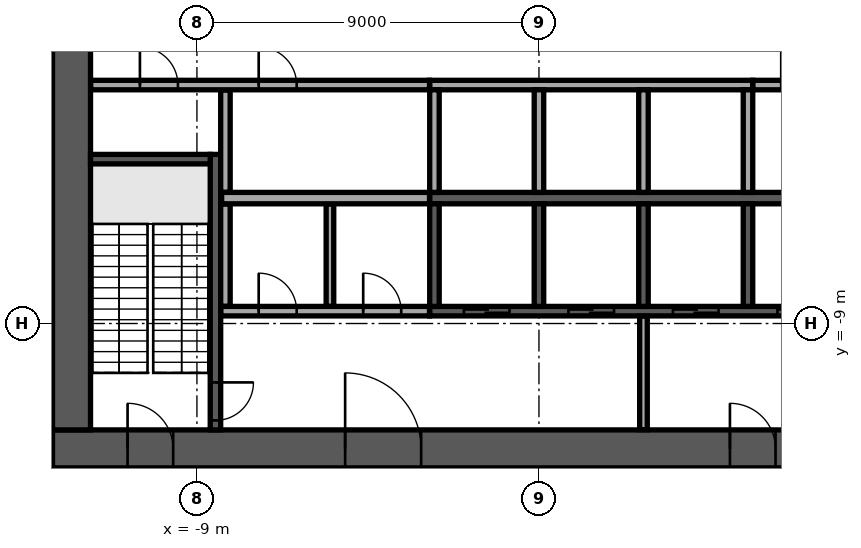
"""IFC4 building model, lengths in metres.
Left out: names, types, materials, properties, quantities, classifications, styles, units other than length and angle.
Written with IfcOpenShell. Run it as: python <this file> out.ifc"""

import sys

from ifc_helpers import new_model, si_unit, direction, frame, frame_2d, origin, place, context, subcontext, project, spatial, rectangle, extrude, element, fill, save


model = new_model("IFC4")
c1 = context("Model", 3, precision=1e-05, world=origin(), true_north=direction((0.0, 1.0)))
c2 = subcontext(c1, "Body", "Model", "MODEL_VIEW")
j1 = project(units=[si_unit("LENGTHUNIT", "METRE"), si_unit("PLANEANGLEUNIT", "RADIAN")], contexts=[c1])
p1 = place(None, origin())
s1 = spatial("IfcSite", under=j1, at=p1, CompositionType="ELEMENT")
p2 = place(p1, origin())
s2 = spatial("IfcBuilding", under=s1, at=p2, CompositionType="ELEMENT")
p3 = place(p2, frame((0.0, 0.0, 183.7)))
s3 = spatial("IfcBuildingStorey", under=s2, at=p3, CompositionType="ELEMENT", Elevation=183.7)
p4 = place(p3, frame((-12.8, -12.3, 0.0), z_axis=(0.0, 0.0, 1.0), x_axis=(1.0, 0.0, 0.0)))
e1 = element("IfcWall", 1, at=p4, inside=s3, PredefinedType="SHEAR", context=c2, shape_type="SweptSolid", body=[
    extrude(rectangle(XDim=25.6, YDim=1.0, at=frame_2d((12.8, 0.0))), origin(), (0.0, 0.0, 1.0), 5.22),
])
p5 = place(p4, frame((7.7, 0.0, 0.0)))
e2 = element("IfcOpeningElement", 2, at=p5, cuts=e1, PredefinedType="OPENING", context=c2, shape_type="SweptSolid", body=[
    extrude(rectangle(XDim=2.0, YDim=2.1, at=frame_2d((1.0, 1.05))), frame((0.0, 0.51, 0.0), z_axis=(0.0, -1.0, 0.0), x_axis=(1.0, 0.0, 0.0)), (0.0, 0.0, 1.0), 1.02),
])
p6 = place(p4, frame((17.825, 0.0, 0.0)))
e3 = element("IfcOpeningElement", 3, at=p6, cuts=e1, PredefinedType="OPENING", context=c2, shape_type="SweptSolid", body=[
    extrude(rectangle(XDim=1.2, YDim=2.1, at=frame_2d((0.6, 1.05))), frame((0.0, 0.51, 0.0), z_axis=(0.0, -1.0, 0.0), x_axis=(1.0, 0.0, 0.0)), (0.0, 0.0, 1.0), 1.02),
])
p7 = place(p4, frame((1.975, 0.0, 0.0)))
e4 = element("IfcOpeningElement", 4, at=p7, cuts=e1, PredefinedType="OPENING", context=c2, shape_type="SweptSolid", body=[
    extrude(rectangle(XDim=1.2, YDim=2.1, at=frame_2d((0.6, 1.05))), frame((0.0, 0.51, 0.0), z_axis=(0.0, -1.0, 0.0), x_axis=(1.0, 0.0, 0.0)), (0.0, 0.0, 1.0), 1.02),
])
p8 = place(p4, frame((22.425, 0.0, 0.0)))
e5 = element("IfcOpeningElement", 5, at=p8, cuts=e1, PredefinedType="OPENING", context=c2, shape_type="SweptSolid", body=[
    extrude(rectangle(XDim=1.2, YDim=2.1, at=frame_2d((0.6, 1.05))), frame((0.0, 0.51, 0.0), z_axis=(0.0, -1.0, 0.0), x_axis=(1.0, 0.0, 0.0)), (0.0, 0.0, 1.0), 1.02),
])
p9 = place(p3, frame((-12.3, -11.8, 0.0), z_axis=(0.0, 0.0, 1.0), x_axis=(0.0, 1.0, 0.0)))
e6 = element("IfcWall", 6, at=p9, inside=s3, PredefinedType="SHEAR", context=c2, shape_type="SweptSolid", body=[
    extrude(rectangle(XDim=23.6, YDim=1.0, at=frame_2d((11.8, 0.0))), origin(), (0.0, 0.0, 1.0), 5.22),
])
p10 = place(p9, frame((10.6, 0.0, 0.0)))
e7 = element("IfcOpeningElement", 7, at=p10, cuts=e6, PredefinedType="OPENING", context=c2, shape_type="SweptSolid", body=[
    extrude(rectangle(XDim=2.4, YDim=2.4, at=frame_2d((1.2, 1.2))), frame((0.0, 0.51, 0.0), z_axis=(0.0, -1.0, 0.0), x_axis=(1.0, 0.0, 0.0)), (0.0, 0.0, 1.0), 1.02),
])
p11 = place(p3, frame((-2.875, -5.7, 0.0), z_axis=(0.0, 0.0, 1.0), x_axis=(1.0, 0.0, 0.0)))
e8 = element("IfcWall", 8, at=p11, inside=s3, PredefinedType="SOLIDWALL", context=c2, shape_type="SweptSolid", body=[
    extrude(rectangle(XDim=11.25, YDim=0.3, at=frame_2d((5.625, 0.0))), origin(), (0.0, 0.0, 1.0), 5.22),
])
p12 = place(p3, frame((-2.875, -2.725, 0.0), z_axis=(0.0, 0.0, 1.0), x_axis=(1.0, 0.0, 0.0)))
e9 = element("IfcWall", 9, at=p12, inside=s3, PredefinedType="SOLIDWALL", context=c2, shape_type="SweptSolid", body=[
    extrude(rectangle(XDim=8.5, YDim=0.25, at=frame_2d((4.25, 0.0))), origin(), (0.0, 0.0, 1.0), 5.22),
])
for number, where, z_axis, x_axis in (
    (10, (-2.75, -5.55, 0.0), (0.0, 0.0, 1.0), (0.0, 1.0, 0.0)),
    (11, (0.0, -5.55, 0.0), (0.0, 0.0, 1.0), (0.0, 1.0, 0.0)),
    (12, (2.75, -5.55, 0.0), (0.0, 0.0, 1.0), (0.0, 1.0, 0.0)),
    (13, (5.5, -5.55, 0.0), (0.0, 0.0, 1.0), (0.0, 1.0, 0.0)),
):
    element("IfcWall", number, at=place(p3, frame(where, z_axis=z_axis, x_axis=x_axis)), inside=s3, PredefinedType="SOLIDWALL", context=c2, shape_type="SweptSolid", body=[
        extrude(rectangle(XDim=2.7, YDim=0.25, at=frame_2d((1.35, 0.0))), origin(), (0.0, 0.0, 1.0), 5.22),
    ])
p13 = place(p3, frame((-2.875, -8.675, 0.0), z_axis=(0.0, 0.0, 1.0), x_axis=(1.0, 0.0, 0.0)))
e14 = element("IfcWall", 14, at=p13, inside=s3, PredefinedType="SOLIDWALL", context=c2, shape_type="SweptSolid", body=[
    extrude(rectangle(XDim=11.25, YDim=0.25, at=frame_2d((5.625, 0.0))), origin(), (0.0, 0.0, 1.0), 5.22),
])
p14 = place(p13, frame((0.9, 0.0, 0.0)))
e15 = element("IfcOpeningElement", 15, at=p14, cuts=e14, PredefinedType="OPENING", context=c2, shape_type="SweptSolid", body=[
    extrude(rectangle(XDim=1.2, YDim=2.1, at=frame_2d((0.6, 1.05))), frame((0.0, 0.135, 0.0), z_axis=(0.0, -1.0, 0.0), x_axis=(1.0, 0.0, 0.0)), (0.0, 0.0, 1.0), 0.27),
])
p15 = place(p13, frame((3.65, 0.0, 0.0)))
e16 = element("IfcOpeningElement", 16, at=p15, cuts=e14, PredefinedType="OPENING", context=c2, shape_type="SweptSolid", body=[
    extrude(rectangle(XDim=1.2, YDim=2.1, at=frame_2d((0.6, 1.05))), frame((0.0, 0.135, 0.0), z_axis=(0.0, -1.0, 0.0), x_axis=(1.0, 0.0, 0.0)), (0.0, 0.0, 1.0), 0.27),
])
p16 = place(p13, frame((6.4, 0.0, 0.0)))
e17 = element("IfcOpeningElement", 17, at=p16, cuts=e14, PredefinedType="OPENING", context=c2, shape_type="SweptSolid", body=[
    extrude(rectangle(XDim=1.2, YDim=2.1, at=frame_2d((0.6, 1.05))), frame((0.0, 0.135, 0.0), z_axis=(0.0, -1.0, 0.0), x_axis=(1.0, 0.0, 0.0)), (0.0, 0.0, 1.0), 0.27),
])
p17 = place(p13, frame((9.15, 0.0, 0.0)))
e18 = element("IfcOpeningElement", 18, at=p17, cuts=e14, PredefinedType="OPENING", context=c2, shape_type="SweptSolid", body=[
    extrude(rectangle(XDim=1.2, YDim=2.1, at=frame_2d((0.6, 1.05))), frame((0.0, 0.135, 0.0), z_axis=(0.0, -1.0, 0.0), x_axis=(1.0, 0.0, 0.0)), (0.0, 0.0, 1.0), 0.27),
])
for number, where, z_axis, x_axis in (
    (19, (-2.75, -8.55, 0.0), (0.0, 0.0, 1.0), (0.0, 1.0, 0.0)),
    (20, (0.0, -8.55, 0.0), (0.0, 0.0, 1.0), (0.0, 1.0, 0.0)),
    (21, (2.75, -8.55, 0.0), (0.0, 0.0, 1.0), (0.0, 1.0, 0.0)),
    (22, (5.5, -8.55, 0.0), (0.0, 0.0, 1.0), (0.0, 1.0, 0.0)),
):
    element("IfcWall", number, at=place(p3, frame(where, z_axis=z_axis, x_axis=x_axis)), inside=s3, PredefinedType="SOLIDWALL", context=c2, shape_type="SweptSolid", body=[
        extrude(rectangle(XDim=2.7, YDim=0.25, at=frame_2d((1.35, 0.0))), origin(), (0.0, 0.0, 1.0), 5.22),
    ])
p18 = place(p3, frame((-8.512, -4.55, 0.0), z_axis=(0.0, 0.0, 1.0), x_axis=(0.0, -1.0, 0.0)))
e23 = element("IfcWall", 23, at=p18, inside=s3, PredefinedType="SOLIDWALL", context=c2, shape_type="SweptSolid", body=[
    extrude(rectangle(XDim=7.25, YDim=0.275, at=frame_2d((3.625, 0.0))), origin(), (0.0, 0.0, 1.0), 5.22),
])
p19 = place(p18, frame((6.0, 0.0, 0.0)))
e24 = element("IfcOpeningElement", 24, at=p19, cuts=e23, PredefinedType="OPENING", context=c2, shape_type="SweptSolid", body=[
    extrude(rectangle(XDim=1.0, YDim=2.1, at=frame_2d((0.5, 1.05))), frame((0.0, 0.147, 0.0), z_axis=(0.0, -1.0, 0.0), x_axis=(1.0, 0.0, 0.0)), (0.0, 0.0, 1.0), 0.295),
])
p20 = place(p3, frame((-8.65, -4.675, 0.0), z_axis=(0.0, 0.0, 1.0), x_axis=(-1.0, 0.0, 0.0)))
e25 = element("IfcWall", 25, at=p20, inside=s3, PredefinedType="SOLIDWALL", context=c2, shape_type="SweptSolid", body=[
    extrude(rectangle(XDim=3.15, YDim=0.25, at=frame_2d((1.575, 0.0))), origin(), (0.0, 0.0, 1.0), 5.22),
])
p21 = place(p3, frame((2.75, -11.795, 0.0), z_axis=(0.0, 0.0, 1.0), x_axis=(0.0, 1.0, 0.0)))
e26 = element("IfcWall", 26, at=p21, inside=s3, PredefinedType="PARTITIONING", context=c2, shape_type="SweptSolid", body=[
    extrude(rectangle(XDim=2.99, YDim=0.2, at=frame_2d((1.495, 0.0))), origin(), (0.0, 0.0, 1.0), 5.22),
])
p22 = place(p3, frame((-8.37, -8.675, 0.0), z_axis=(0.0, 0.0, 1.0), x_axis=(1.0, 0.0, 0.0)))
e27 = element("IfcWall", 27, at=p22, inside=s3, PredefinedType="PARTITIONING", context=c2, shape_type="SweptSolid", body=[
    extrude(rectangle(XDim=5.49, YDim=0.25, at=frame_2d((2.745, 0.0))), origin(), (0.0, 0.0, 1.0), 5.22),
])
p23 = place(p22, frame((0.995, 0.0, 0.0)))
e28 = element("IfcOpeningElement", 28, at=p23, cuts=e27, PredefinedType="OPENING", context=c2, shape_type="SweptSolid", body=[
    extrude(rectangle(XDim=1.0, YDim=2.1, at=frame_2d((0.5, 1.05))), frame((0.0, 0.135, 0.0), z_axis=(0.0, -1.0, 0.0), x_axis=(1.0, 0.0, 0.0)), (0.0, 0.0, 1.0), 0.27),
])
p24 = place(p22, frame((3.745, 0.0, 0.0)))
e29 = element("IfcOpeningElement", 29, at=p24, cuts=e27, PredefinedType="OPENING", context=c2, shape_type="SweptSolid", body=[
    extrude(rectangle(XDim=1.0, YDim=2.1, at=frame_2d((0.5, 1.05))), frame((0.0, 0.135, 0.0), z_axis=(0.0, -1.0, 0.0), x_axis=(1.0, 0.0, 0.0)), (0.0, 0.0, 1.0), 0.27),
])
p25 = place(p3, frame((-8.25, -8.545, 0.0), z_axis=(0.0, 0.0, 1.0), x_axis=(0.0, 1.0, 0.0)))
e30 = element("IfcWall", 30, at=p25, inside=s3, PredefinedType="PARTITIONING", context=c2, shape_type="SweptSolid", body=[
    extrude(rectangle(XDim=2.69, YDim=0.25, at=frame_2d((1.345, 0.0))), origin(), (0.0, 0.0, 1.0), 5.22),
])
p26 = place(p3, frame((-5.5, -8.545, 0.0), z_axis=(0.0, 0.0, 1.0), x_axis=(0.0, 1.0, 0.0)))
e31 = element("IfcWall", 31, at=p26, inside=s3, PredefinedType="PARTITIONING", context=c2, shape_type="SweptSolid", body=[
    extrude(rectangle(XDim=2.69, YDim=0.2, at=frame_2d((1.345, 0.0))), origin(), (0.0, 0.0, 1.0), 5.22),
])
p27 = place(p3, frame((-8.35, -5.7, 0.0), z_axis=(0.0, 0.0, 1.0), x_axis=(1.0, 0.0, 0.0)))
e32 = element("IfcWall", 32, at=p27, inside=s3, PredefinedType="PARTITIONING", context=c2, shape_type="SweptSolid", body=[
    extrude(rectangle(XDim=5.47, YDim=0.3, at=frame_2d((2.735, 0.0))), origin(), (0.0, 0.0, 1.0), 5.22),
])
p28 = place(p3, frame((-8.25, -5.545, 0.0), z_axis=(0.0, 0.0, 1.0), x_axis=(0.0, 1.0, 0.0)))
e33 = element("IfcWall", 33, at=p28, inside=s3, PredefinedType="PARTITIONING", context=c2, shape_type="SweptSolid", body=[
    extrude(rectangle(XDim=2.69, YDim=0.25, at=frame_2d((1.345, 0.0))), origin(), (0.0, 0.0, 1.0), 5.22),
])
p29 = place(p3, frame((-11.795, -2.725, 0.0), z_axis=(0.0, 0.0, 1.0), x_axis=(1.0, 0.0, 0.0)))
e34 = element("IfcWall", 34, at=p29, inside=s3, PredefinedType="PARTITIONING", context=c2, shape_type="SweptSolid", body=[
    extrude(rectangle(XDim=8.915, YDim=0.25, at=frame_2d((4.458, 0.0))), origin(), (0.0, 0.0, 1.0), 5.22),
])
p30 = place(p29, frame((1.295, 0.0, 0.0)))
e35 = element("IfcOpeningElement", 35, at=p30, cuts=e34, PredefinedType="OPENING", context=c2, shape_type="SweptSolid", body=[
    extrude(rectangle(XDim=1.0, YDim=2.1, at=frame_2d((0.5, 1.05))), frame((0.0, 0.135, 0.0), z_axis=(0.0, -1.0, 0.0), x_axis=(1.0, 0.0, 0.0)), (0.0, 0.0, 1.0), 0.27),
])
p31 = place(p29, frame((4.42, 0.0, 0.0)))
e36 = element("IfcOpeningElement", 36, at=p31, cuts=e34, PredefinedType="OPENING", context=c2, shape_type="SweptSolid", body=[
    extrude(rectangle(XDim=1.0, YDim=2.1, at=frame_2d((0.5, 1.05))), frame((0.0, 0.135, 0.0), z_axis=(0.0, -1.0, 0.0), x_axis=(1.0, 0.0, 0.0)), (0.0, 0.0, 1.0), 0.27),
])
p32 = place(p3, frame((5.63, -2.725, 0.0), z_axis=(0.0, 0.0, 1.0), x_axis=(1.0, 0.0, 0.0)))
e37 = element("IfcWall", 37, at=p32, inside=s3, PredefinedType="PARTITIONING", context=c2, shape_type="SweptSolid", body=[
    extrude(rectangle(XDim=6.165, YDim=0.25, at=frame_2d((3.083, 0.0))), origin(), (0.0, 0.0, 1.0), 5.22),
])
p33 = place(p32, frame((0.745, 0.0, 0.0)))
e38 = element("IfcOpeningElement", 38, at=p33, cuts=e37, PredefinedType="OPENING", context=c2, shape_type="SweptSolid", body=[
    extrude(rectangle(XDim=1.0, YDim=2.1, at=frame_2d((0.5, 1.05))), frame((0.0, 0.135, 0.0), z_axis=(0.0, -1.0, 0.0), x_axis=(1.0, 0.0, 0.0)), (0.0, 0.0, 1.0), 0.27),
])
p34 = place(p32, frame((3.92, 0.0, 0.0)))
e39 = element("IfcOpeningElement", 39, at=p34, cuts=e37, PredefinedType="OPENING", context=c2, shape_type="SweptSolid", body=[
    extrude(rectangle(XDim=0.9, YDim=2.1, at=frame_2d((0.45, 1.05))), frame((0.0, 0.135, 0.0), z_axis=(0.0, -1.0, 0.0), x_axis=(1.0, 0.0, 0.0)), (0.0, 0.0, 1.0), 0.27),
])
p35 = place(p3, frame((-36.47, -2.156, 0.0), z_axis=(0.0, 0.0, 1.0), x_axis=(0.629322340193, -0.777144383068, 0.0)))
e40 = element("IfcWall", 40, at=p35, inside=s3, PredefinedType="STANDARD", context=c2, shape_type="SweptSolid", body=[
    extrude(rectangle(XDim=42.552, YDim=0.6, at=frame_2d((21.276, 0.0))), origin(), (0.0, 0.0, 1.0), 5.22),
])
p36 = place(p35, frame((1.178, 0.0, 0.6)))
e41 = element("IfcOpeningElement", 41, at=p36, cuts=e40, PredefinedType="OPENING", context=c2, shape_type="SweptSolid", body=[
    extrude(rectangle(XDim=1.8, YDim=4.17, at=frame_2d((0.9, 2.085))), frame((0.0, 0.31, 0.0), z_axis=(0.0, -1.0, 0.0), x_axis=(1.0, 0.0, 0.0)), (0.0, 0.0, 1.0), 0.62),
])
p37 = place(p35, frame((5.396, 0.0, 0.6)))
e42 = element("IfcOpeningElement", 42, at=p37, cuts=e40, PredefinedType="OPENING", context=c2, shape_type="SweptSolid", body=[
    extrude(rectangle(XDim=1.8, YDim=4.17, at=frame_2d((0.9, 2.085))), frame((0.0, 0.31, 0.0), z_axis=(0.0, -1.0, 0.0), x_axis=(1.0, 0.0, 0.0)), (0.0, 0.0, 1.0), 0.62),
])
p38 = place(p35, frame((9.676, 0.0, 0.6)))
e43 = element("IfcOpeningElement", 43, at=p38, cuts=e40, PredefinedType="OPENING", context=c2, shape_type="SweptSolid", body=[
    extrude(rectangle(XDim=1.8, YDim=4.17, at=frame_2d((0.9, 2.085))), frame((0.0, 0.31, 0.0), z_axis=(0.0, -1.0, 0.0), x_axis=(1.0, 0.0, 0.0)), (0.0, 0.0, 1.0), 0.62),
])
p39 = place(p35, frame((35.356, 0.0, 0.6)))
e44 = element("IfcOpeningElement", 44, at=p39, cuts=e40, PredefinedType="OPENING", context=c2, shape_type="SweptSolid", body=[
    extrude(rectangle(XDim=1.8, YDim=4.17, at=frame_2d((0.9, 2.085))), frame((0.0, 0.31, 0.0), z_axis=(0.0, -1.0, 0.0), x_axis=(1.0, 0.0, 0.0)), (0.0, 0.0, 1.0), 0.62),
])
p40 = place(p35, frame((39.573, 0.0, 0.6)))
e45 = element("IfcOpeningElement", 45, at=p40, cuts=e40, PredefinedType="OPENING", context=c2, shape_type="SweptSolid", body=[
    extrude(rectangle(XDim=1.8, YDim=4.17, at=frame_2d((0.9, 2.085))), frame((0.0, 0.31, 0.0), z_axis=(0.0, -1.0, 0.0), x_axis=(1.0, 0.0, 0.0)), (0.0, 0.0, 1.0), 0.62),
])
p41 = place(p3, frame((-2.907, -35.938, 0.0), z_axis=(0.0, 0.0, 1.0), x_axis=(0.777145668104, 0.629320753311, 0.0)))
e46 = element("IfcWall", 46, at=p41, inside=s3, PredefinedType="STANDARD", context=c2, shape_type="SweptSolid", body=[
    extrude(rectangle(XDim=49.751, YDim=0.6, at=frame_2d((24.876, 0.0))), origin(), (0.0, 0.0, 1.0), 5.22),
])
p42 = place(p41, frame((1.161, 0.0, 0.6)))
e47 = element("IfcOpeningElement", 47, at=p42, cuts=e46, PredefinedType="OPENING", context=c2, shape_type="SweptSolid", body=[
    extrude(rectangle(XDim=2.1, YDim=4.17, at=frame_2d((1.05, 2.085))), frame((0.0, 0.31, 0.0), z_axis=(0.0, -1.0, 0.0), x_axis=(1.0, 0.0, 0.0)), (0.0, 0.0, 1.0), 0.62),
])
p43 = place(p41, frame((5.644, 0.0, 0.6)))
e48 = element("IfcOpeningElement", 48, at=p43, cuts=e46, PredefinedType="OPENING", context=c2, shape_type="SweptSolid", body=[
    extrude(rectangle(XDim=2.1, YDim=4.17, at=frame_2d((1.05, 2.085))), frame((0.0, 0.31, 0.0), z_axis=(0.0, -1.0, 0.0), x_axis=(1.0, 0.0, 0.0)), (0.0, 0.0, 1.0), 0.62),
])
p44 = place(p41, frame((10.189, 0.0, 0.6)))
e49 = element("IfcOpeningElement", 49, at=p44, cuts=e46, PredefinedType="OPENING", context=c2, shape_type="SweptSolid", body=[
    extrude(rectangle(XDim=2.1, YDim=4.17, at=frame_2d((1.05, 2.085))), frame((0.0, 0.31, 0.0), z_axis=(0.0, -1.0, 0.0), x_axis=(1.0, 0.0, 0.0)), (0.0, 0.0, 1.0), 0.62),
])
p45 = place(p41, frame((19.28, 0.0, 0.6)))
e50 = element("IfcOpeningElement", 50, at=p45, cuts=e46, PredefinedType="OPENING", context=c2, shape_type="SweptSolid", body=[
    extrude(rectangle(XDim=2.1, YDim=4.17, at=frame_2d((1.05, 2.085))), frame((0.0, 0.31, 0.0), z_axis=(0.0, -1.0, 0.0), x_axis=(1.0, 0.0, 0.0)), (0.0, 0.0, 1.0), 0.62),
])
p46 = place(p41, frame((42.008, 0.0, 0.6)))
e51 = element("IfcOpeningElement", 51, at=p46, cuts=e46, PredefinedType="OPENING", context=c2, shape_type="SweptSolid", body=[
    extrude(rectangle(XDim=2.1, YDim=4.17, at=frame_2d((1.05, 2.085))), frame((0.0, 0.31, 0.0), z_axis=(0.0, -1.0, 0.0), x_axis=(1.0, 0.0, 0.0)), (0.0, 0.0, 1.0), 0.62),
])
p47 = place(p41, frame((46.491, 0.0, 0.6)))
e52 = element("IfcOpeningElement", 52, at=p47, cuts=e46, PredefinedType="OPENING", context=c2, shape_type="SweptSolid", body=[
    extrude(rectangle(XDim=2.1, YDim=4.17, at=frame_2d((1.05, 2.085))), frame((0.0, 0.31, 0.0), z_axis=(0.0, -1.0, 0.0), x_axis=(1.0, 0.0, 0.0)), (0.0, 0.0, 1.0), 0.62),
])
p48 = place(p5, origin())
e53 = element("IfcDoor", 53, at=p48, inside=s3, OperationType="SINGLE_SWING_LEFT", PredefinedType="DOOR", context=c2, shape_type="SweptSolid", body=[
    extrude(rectangle(XDim=2.0, YDim=2.1, at=frame_2d((1.0, 1.05))), frame((0.0, 0.025, 0.0), z_axis=(0.0, -1.0, 0.0), x_axis=(1.0, 0.0, 0.0)), (0.0, 0.0, 1.0), 0.05),
])
fill(e2, e53)
p49 = place(p6, origin())
e54 = element("IfcDoor", 54, at=p49, inside=s3, OperationType="SINGLE_SWING_LEFT", PredefinedType="DOOR", context=c2, shape_type="SweptSolid", body=[
    extrude(rectangle(XDim=1.2, YDim=2.1, at=frame_2d((0.6, 1.05))), frame((0.0, 0.025, 0.0), z_axis=(0.0, -1.0, 0.0), x_axis=(1.0, 0.0, 0.0)), (0.0, 0.0, 1.0), 0.05),
])
fill(e3, e54)
p50 = place(p7, origin())
e55 = element("IfcDoor", 55, at=p50, inside=s3, OperationType="SINGLE_SWING_LEFT", PredefinedType="DOOR", context=c2, shape_type="SweptSolid", body=[
    extrude(rectangle(XDim=1.2, YDim=2.1, at=frame_2d((0.6, 1.05))), frame((0.0, 0.025, 0.0), z_axis=(0.0, -1.0, 0.0), x_axis=(1.0, 0.0, 0.0)), (0.0, 0.0, 1.0), 0.05),
])
fill(e4, e55)
p51 = place(p14, origin())
e56 = element("IfcDoor", 56, at=p51, inside=s3, OperationType="DOUBLE_DOOR_SLIDING", PredefinedType="DOOR", context=c2, shape_type="SweptSolid", body=[
    extrude(rectangle(XDim=1.2, YDim=2.1, at=frame_2d((0.6, 1.05))), frame((0.0, 0.025, 0.0), z_axis=(0.0, -1.0, 0.0), x_axis=(1.0, 0.0, 0.0)), (0.0, 0.0, 1.0), 0.05),
])
fill(e15, e56)
p52 = place(p15, origin())
e57 = element("IfcDoor", 57, at=p52, inside=s3, OperationType="DOUBLE_DOOR_SLIDING", PredefinedType="DOOR", context=c2, shape_type="SweptSolid", body=[
    extrude(rectangle(XDim=1.2, YDim=2.1, at=frame_2d((0.6, 1.05))), frame((0.0, 0.025, 0.0), z_axis=(0.0, -1.0, 0.0), x_axis=(1.0, 0.0, 0.0)), (0.0, 0.0, 1.0), 0.05),
])
fill(e16, e57)
p53 = place(p16, origin())
e58 = element("IfcDoor", 58, at=p53, inside=s3, OperationType="DOUBLE_DOOR_SLIDING", PredefinedType="DOOR", context=c2, shape_type="SweptSolid", body=[
    extrude(rectangle(XDim=1.2, YDim=2.1, at=frame_2d((0.6, 1.05))), frame((0.0, 0.025, 0.0), z_axis=(0.0, -1.0, 0.0), x_axis=(1.0, 0.0, 0.0)), (0.0, 0.0, 1.0), 0.05),
])
fill(e17, e58)
p54 = place(p17, origin())
e59 = element("IfcDoor", 59, at=p54, inside=s3, OperationType="DOUBLE_DOOR_SLIDING", PredefinedType="DOOR", context=c2, shape_type="SweptSolid", body=[
    extrude(rectangle(XDim=1.2, YDim=2.1, at=frame_2d((0.6, 1.05))), frame((0.0, 0.025, 0.0), z_axis=(0.0, -1.0, 0.0), x_axis=(1.0, 0.0, 0.0)), (0.0, 0.0, 1.0), 0.05),
])
fill(e18, e59)
p55 = place(p19, origin())
e60 = element("IfcDoor", 60, at=p55, inside=s3, OperationType="SINGLE_SWING_LEFT", PredefinedType="DOOR", context=c2, shape_type="SweptSolid", body=[
    extrude(rectangle(XDim=1.0, YDim=2.1, at=frame_2d((0.5, 1.05))), frame((0.0, 0.025, 0.0), z_axis=(0.0, -1.0, 0.0), x_axis=(1.0, 0.0, 0.0)), (0.0, 0.0, 1.0), 0.05),
])
fill(e24, e60)
p56 = place(p23, origin())
e61 = element("IfcDoor", 61, at=p56, inside=s3, OperationType="SINGLE_SWING_RIGHT", PredefinedType="DOOR", context=c2, shape_type="SweptSolid", body=[
    extrude(rectangle(XDim=1.0, YDim=2.1, at=frame_2d((0.5, 1.05))), frame((0.0, 0.025, 0.0), z_axis=(0.0, -1.0, 0.0), x_axis=(1.0, 0.0, 0.0)), (0.0, 0.0, 1.0), 0.05),
])
fill(e28, e61)
p57 = place(p24, origin())
e62 = element("IfcDoor", 62, at=p57, inside=s3, OperationType="SINGLE_SWING_RIGHT", PredefinedType="DOOR", context=c2, shape_type="SweptSolid", body=[
    extrude(rectangle(XDim=1.0, YDim=2.1, at=frame_2d((0.5, 1.05))), frame((0.0, 0.025, 0.0), z_axis=(0.0, -1.0, 0.0), x_axis=(1.0, 0.0, 0.0)), (0.0, 0.0, 1.0), 0.05),
])
fill(e29, e62)
p58 = place(p30, origin())
e63 = element("IfcDoor", 63, at=p58, inside=s3, OperationType="SINGLE_SWING_RIGHT", PredefinedType="DOOR", context=c2, shape_type="SweptSolid", body=[
    extrude(rectangle(XDim=1.0, YDim=2.1, at=frame_2d((0.5, 1.05))), frame((0.0, 0.025, 0.0), z_axis=(0.0, -1.0, 0.0), x_axis=(1.0, 0.0, 0.0)), (0.0, 0.0, 1.0), 0.05),
])
fill(e35, e63)
p59 = place(p31, origin())
e64 = element("IfcDoor", 64, at=p59, inside=s3, OperationType="SINGLE_SWING_RIGHT", PredefinedType="DOOR", context=c2, shape_type="SweptSolid", body=[
    extrude(rectangle(XDim=1.0, YDim=2.1, at=frame_2d((0.5, 1.05))), frame((0.0, 0.025, 0.0), z_axis=(0.0, -1.0, 0.0), x_axis=(1.0, 0.0, 0.0)), (0.0, 0.0, 1.0), 0.05),
])
fill(e36, e64)
save(model, sys.argv[1])
